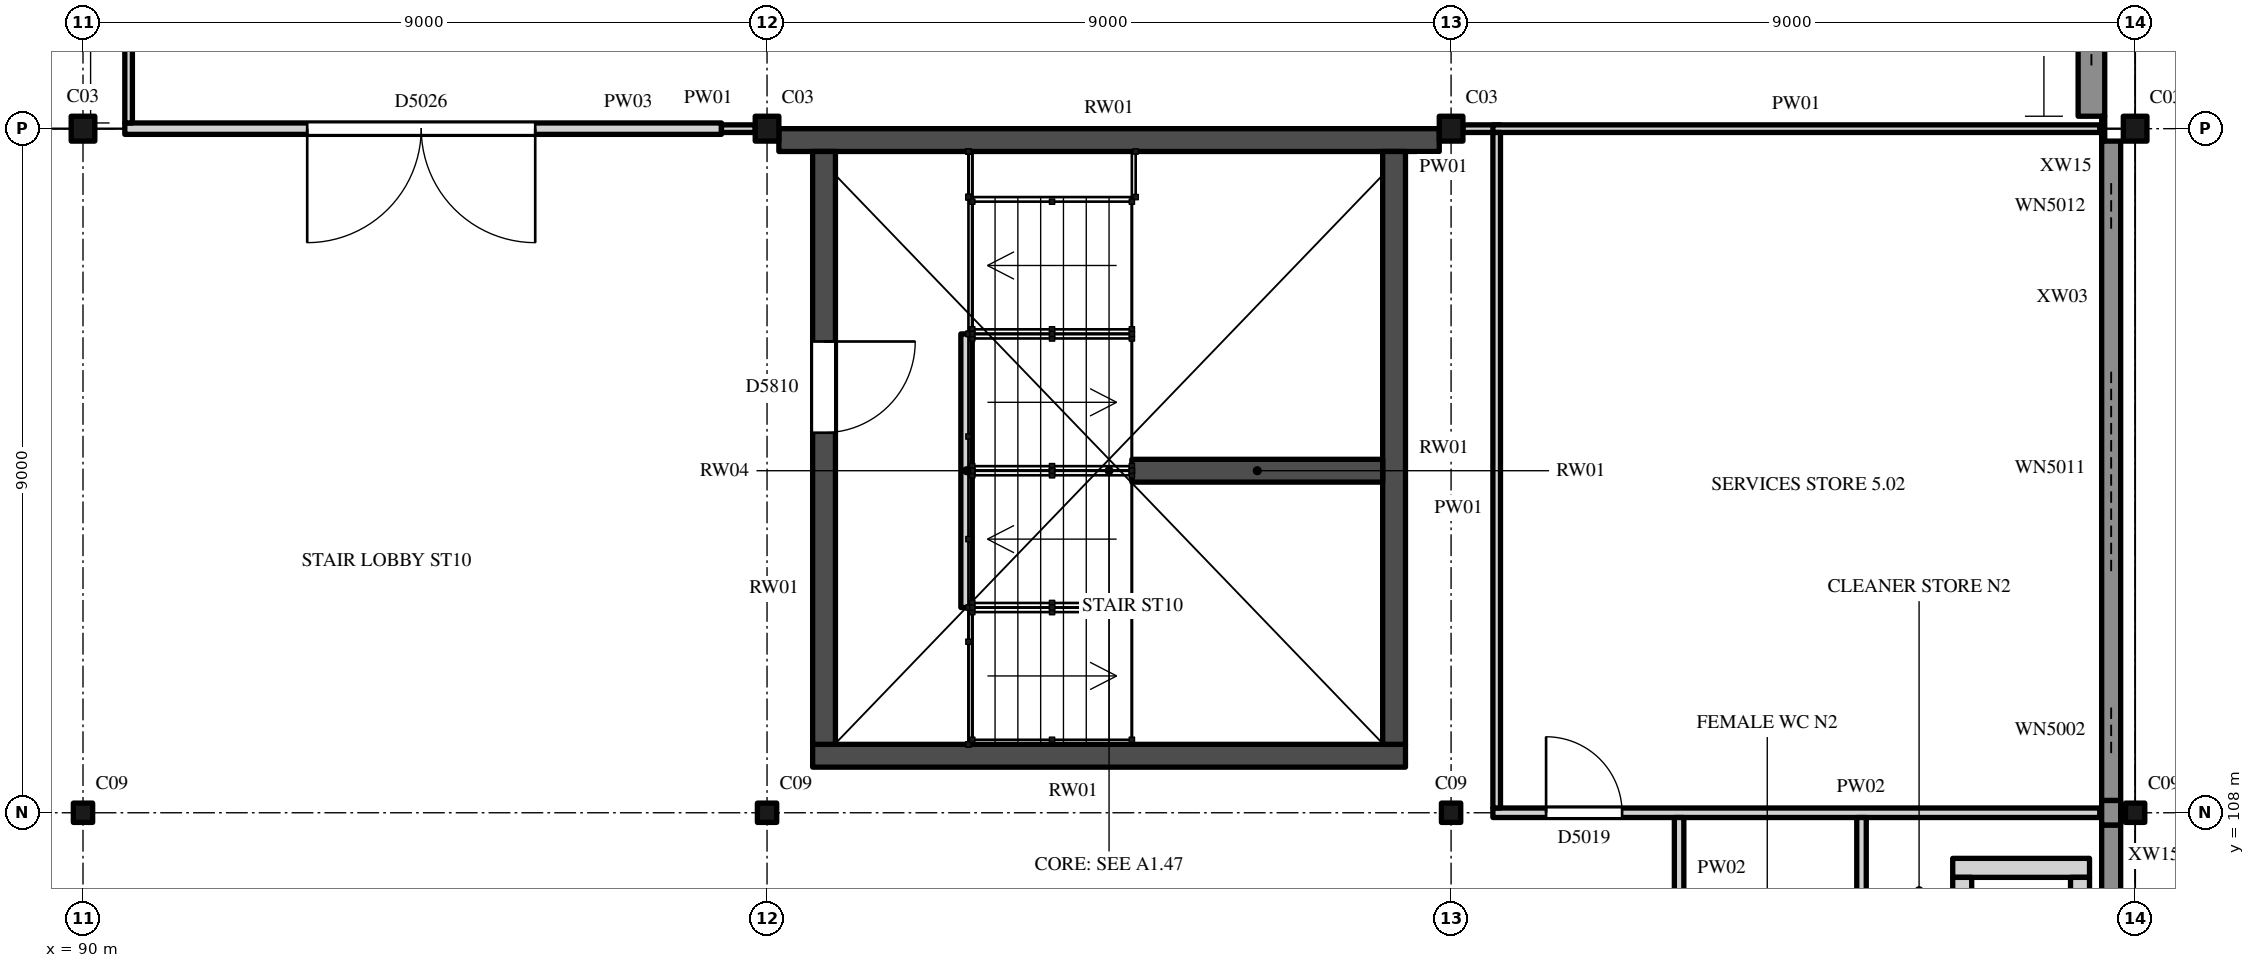
"""IFC4 building model, lengths in metres.
Left out: names, types, materials, properties, quantities, classifications, styles, units other than length and angle.
Written with IfcOpenShell. Run it as: python <this file> out.ifc"""

import sys

from ifc_helpers import new_model, si_unit, direction, frame, frame_2d, origin, origin_2d, place, context, subcontext, project, spatial, rectangle, i_section, extrude, element, fill, save


model = new_model("IFC4")
c1 = context("Model", 3, precision=1e-05, world=origin(), true_north=direction((0.0, 1.0)))
c2 = subcontext(c1, "Body", "Model", "MODEL_VIEW")
j1 = project(units=[si_unit("LENGTHUNIT", "METRE"), si_unit("PLANEANGLEUNIT", "RADIAN")], contexts=[c1])
p1 = place(None, origin())
s1 = spatial("IfcSite", under=j1, at=p1, CompositionType="ELEMENT")
p2 = place(p1, origin())
s2 = spatial("IfcBuilding", under=s1, at=p2, CompositionType="ELEMENT")
p3 = place(p2, frame((0.0, 0.0, 31.0)))
s3 = spatial("IfcBuildingStorey", under=s2, at=p3, CompositionType="ELEMENT", Elevation=31.0)
for number, where, z_axis, x_axis in (
    (1, (90.0, 108.0, 0.0), (0.0, 0.0, 1.0), (1.0, 0.0, 0.0)),
    (2, (99.0, 108.0, 0.0), (0.0, 0.0, 1.0), (1.0, 0.0, 0.0)),
    (3, (108.0, 108.0, 0.0), (0.0, 0.0, 1.0), (1.0, 0.0, 0.0)),
    (4, (117.0, 108.0, 0.0), (0.0, 0.0, 1.0), (1.0, 0.0, 0.0)),
):
    element("IfcColumn", number, at=place(p3, frame(where, z_axis=z_axis, x_axis=x_axis)), inside=s3, PredefinedType="COLUMN", context=c2, shape_type="SweptSolid", body=[
        extrude(i_section(OverallWidth=0.254, OverallDepth=0.254, WebThickness=0.009, FlangeThickness=0.014, FilletRadius=0.014, at=origin_2d()), origin(), (0.0, 0.0, 1.0), 5.0),
    ])
for number, where, z_axis, x_axis in (
    (5, (90.0, 117.0, 0.0), (0.0, 0.0, 1.0), (1.0, 0.0, 0.0)),
    (6, (99.0, 117.0, 0.0), (0.0, 0.0, 1.0), (1.0, 0.0, 0.0)),
    (7, (108.0, 117.0, 0.0), (0.0, 0.0, 1.0), (1.0, 0.0, 0.0)),
    (8, (117.0, 117.0, 0.0), (0.0, 0.0, 1.0), (1.0, 0.0, 0.0)),
):
    element("IfcColumn", number, at=place(p3, frame(where, z_axis=z_axis, x_axis=x_axis)), inside=s3, PredefinedType="COLUMN", context=c2, shape_type="SweptSolid", body=[
        extrude(i_section(OverallWidth=0.311, OverallDepth=0.327, WebThickness=0.016, FlangeThickness=0.025, FilletRadius=0.017, at=origin_2d()), origin(), (0.0, 0.0, 1.0), 5.0),
    ])
p4 = place(p3, frame((99.6, 108.75, 0.0), z_axis=(0.0, 0.0, 1.0), x_axis=(1.0, 0.0, 0.0)))
e9 = element("IfcWall", 9, at=p4, inside=s3, PredefinedType="SHEAR", context=c2, shape_type="SweptSolid", body=[
    extrude(rectangle(XDim=7.8, YDim=0.3, at=frame_2d((3.9, 0.0))), origin(), (0.0, 0.0, 1.0), 5.0),
])
p5 = place(p3, frame((99.156, 116.85, 0.0), z_axis=(0.0, 0.0, 1.0), x_axis=(1.0, 0.0, 0.0)))
e10 = element("IfcWall", 10, at=p5, inside=s3, PredefinedType="SHEAR", context=c2, shape_type="SweptSolid", body=[
    extrude(rectangle(XDim=8.689, YDim=0.3, at=frame_2d((4.344, 0.0))), origin(), (0.0, 0.0, 1.0), 5.0),
])
p6 = place(p3, frame((99.75, 108.9, 0.0), z_axis=(0.0, 0.0, 1.0), x_axis=(0.0, 1.0, 0.0)))
e11 = element("IfcWall", 11, at=p6, inside=s3, PredefinedType="SHEAR", context=c2, shape_type="SweptSolid", body=[
    extrude(rectangle(XDim=7.8, YDim=0.3, at=frame_2d((3.9, 0.0))), origin(), (0.0, 0.0, 1.0), 5.0),
])
p7 = place(p6, frame((4.1, 0.0, 0.0)))
e12 = element("IfcOpeningElement", 12, at=p7, cuts=e11, PredefinedType="OPENING", context=c2, shape_type="SweptSolid", body=[
    extrude(rectangle(XDim=1.2, YDim=2.1, at=frame_2d((0.6, 1.05))), frame((0.0, 0.16, 0.0), z_axis=(0.0, -1.0, 0.0), x_axis=(1.0, 0.0, 0.0)), (0.0, 0.0, 1.0), 0.32),
])
p8 = place(p3, frame((107.25, 108.9, 0.0), z_axis=(0.0, 0.0, 1.0), x_axis=(0.0, 1.0, 0.0)))
e13 = element("IfcWall", 13, at=p8, inside=s3, PredefinedType="SHEAR", context=c2, shape_type="SweptSolid", body=[
    extrude(rectangle(XDim=7.8, YDim=0.3, at=frame_2d((3.9, 0.0))), origin(), (0.0, 0.0, 1.0), 5.0),
])
p9 = place(p3, frame((103.8, 112.5, 0.0), z_axis=(0.0, 0.0, 1.0), x_axis=(1.0, 0.0, 0.0)))
e14 = element("IfcWall", 14, at=p9, inside=s3, PredefinedType="SHEAR", context=c2, shape_type="SweptSolid", body=[
    extrude(rectangle(XDim=3.3, YDim=0.3, at=frame_2d((1.65, 0.0))), origin(), (0.0, 0.0, 1.0), 5.0),
])
p10 = place(p3, frame((101.625, 110.7, 0.0), z_axis=(0.0, 0.0, 1.0), x_axis=(0.0, 1.0, 0.0)))
e15 = element("IfcWall", 15, at=p10, inside=s3, PredefinedType="STANDARD", context=c2, shape_type="SweptSolid", body=[
    extrude(rectangle(XDim=3.6, YDim=0.15, at=frame_2d((1.8, 0.0))), origin(), (0.0, 0.0, 1.0), 2.3),
])
p11 = place(p3, frame((114.6, 107.275, 0.0), z_axis=(0.0, 0.0, 1.0), x_axis=(1.0, 0.0, 0.0)))
e16 = element("IfcWall", 16, at=p11, inside=s3, PredefinedType="STANDARD", context=c2, shape_type="SweptSolid", body=[
    extrude(rectangle(XDim=1.8, YDim=0.25, at=frame_2d((0.9, 0.0))), origin(), (0.0, 0.0, 1.0), 5.0),
])
p12 = place(p3, frame((114.725, 104.65, 0.0), z_axis=(0.0, 0.0, 1.0), x_axis=(0.0, 1.0, 0.0)))
e17 = element("IfcWall", 17, at=p12, inside=s3, PredefinedType="STANDARD", context=c2, shape_type="SweptSolid", body=[
    extrude(rectangle(XDim=2.5, YDim=0.25, at=frame_2d((1.25, 0.0))), origin(), (0.0, 0.0, 1.0), 5.0),
])
p13 = place(p3, frame((116.275, 104.65, 0.0), z_axis=(0.0, 0.0, 1.0), x_axis=(0.0, 1.0, 0.0)))
e18 = element("IfcWall", 18, at=p13, inside=s3, PredefinedType="STANDARD", context=c2, shape_type="SweptSolid", body=[
    extrude(rectangle(XDim=2.5, YDim=0.25, at=frame_2d((1.25, 0.0))), origin(), (0.0, 0.0, 1.0), 5.0),
])
p14 = place(p13, frame((0.8, 0.0, 0.0)))
e19 = element("IfcOpeningElement", 19, at=p14, cuts=e18, PredefinedType="OPENING", context=c2, shape_type="SweptSolid", body=[
    extrude(rectangle(XDim=0.9, YDim=2.1, at=frame_2d((0.45, 1.05))), frame((0.0, 0.135, 0.0), z_axis=(0.0, -1.0, 0.0), x_axis=(1.0, 0.0, 0.0)), (0.0, 0.0, 1.0), 0.27),
])
p15 = place(p3, frame((116.685, 99.161, 0.0), z_axis=(0.0, 0.0, 1.0), x_axis=(0.0, 1.0, 0.0)))
e20 = element("IfcWall", 20, at=p15, inside=s3, PredefinedType="SOLIDWALL", context=c2, shape_type="SweptSolid", body=[
    extrude(rectangle(XDim=8.678, YDim=0.25, at=frame_2d((4.339, 0.0))), origin(), (0.0, 0.0, 1.0), 4.504),
])
p16 = place(p3, frame((116.685, 108.161, 0.0), z_axis=(0.0, 0.0, 1.0), x_axis=(0.0, 1.0, 0.0)))
e21 = element("IfcWall", 21, at=p16, inside=s3, PredefinedType="SOLIDWALL", context=c2, shape_type="SweptSolid", body=[
    extrude(rectangle(XDim=8.676, YDim=0.25, at=frame_2d((4.338, 0.0))), origin(), (0.0, 0.0, 1.0), 4.504),
])
p17 = place(p16, frame((0.623, 0.0, 1.6)))
e22 = element("IfcOpeningElement", 22, at=p17, cuts=e21, PredefinedType="OPENING", context=c2, shape_type="SweptSolid", body=[
    extrude(rectangle(XDim=0.6, YDim=1.2, at=frame_2d((0.3, 0.6))), frame((0.0, 0.135, 0.0), z_axis=(0.0, -1.0, 0.0), x_axis=(1.0, 0.0, 0.0)), (0.0, 0.0, 1.0), 0.27),
])
p18 = place(p16, frame((3.017, 0.0, 1.6)))
e23 = element("IfcOpeningElement", 23, at=p18, cuts=e21, PredefinedType="OPENING", context=c2, shape_type="SweptSolid", body=[
    extrude(rectangle(XDim=2.7, YDim=1.2, at=frame_2d((1.35, 0.6))), frame((0.0, 0.135, 0.0), z_axis=(0.0, -1.0, 0.0), x_axis=(1.0, 0.0, 0.0)), (0.0, 0.0, 1.0), 0.27),
])
p19 = place(p16, frame((7.523, 0.0, 1.6)))
e24 = element("IfcOpeningElement", 24, at=p19, cuts=e21, PredefinedType="OPENING", context=c2, shape_type="SweptSolid", body=[
    extrude(rectangle(XDim=0.6, YDim=1.2, at=frame_2d((0.3, 0.6))), frame((0.0, 0.135, 0.0), z_axis=(0.0, -1.0, 0.0), x_axis=(1.0, 0.0, 0.0)), (0.0, 0.0, 1.0), 0.27),
])
p20 = place(p3, frame((116.425, 117.164, 0.0), z_axis=(0.0, 0.0, 1.0), x_axis=(0.0, 1.0, 0.0)))
e25 = element("IfcWall", 25, at=p20, inside=s3, PredefinedType="SOLIDWALL", context=c2, shape_type="SweptSolid", body=[
    extrude(rectangle(XDim=8.836, YDim=0.35, at=frame_2d((4.418, 0.0))), origin(), (0.0, 0.0, 1.0), 4.825),
])
p21 = place(p20, frame((0.668, 0.0, 1.6)))
e26 = element("IfcOpeningElement", 26, at=p21, cuts=e25, PredefinedType="OPENING", context=c2, shape_type="SweptSolid", body=[
    extrude(rectangle(XDim=0.6, YDim=1.2, at=frame_2d((0.3, 0.6))), frame((0.0, 0.185, 0.0), z_axis=(0.0, -1.0, 0.0), x_axis=(1.0, 0.0, 0.0)), (0.0, 0.0, 1.0), 0.37),
])
p22 = place(p20, frame((3.042, 0.0, 1.6)))
e27 = element("IfcOpeningElement", 27, at=p22, cuts=e25, PredefinedType="OPENING", context=c2, shape_type="SweptSolid", body=[
    extrude(rectangle(XDim=2.7, YDim=1.2, at=frame_2d((1.35, 0.6))), frame((0.0, 0.185, 0.0), z_axis=(0.0, -1.0, 0.0), x_axis=(1.0, 0.0, 0.0)), (0.0, 0.0, 1.0), 0.37),
])
p23 = place(p20, frame((7.568, 0.0, 1.6)))
e28 = element("IfcOpeningElement", 28, at=p23, cuts=e25, PredefinedType="OPENING", context=c2, shape_type="SweptSolid", body=[
    extrude(rectangle(XDim=0.6, YDim=1.2, at=frame_2d((0.3, 0.6))), frame((0.0, 0.185, 0.0), z_axis=(0.0, -1.0, 0.0), x_axis=(1.0, 0.0, 0.0)), (0.0, 0.0, 1.0), 0.37),
])
p24 = place(p3, frame((116.685, 107.839, 0.0), z_axis=(0.0, 0.0, 1.0), x_axis=(0.0, 1.0, 0.0)))
e29 = element("IfcWall", 29, at=p24, inside=s3, PredefinedType="SOLIDWALL", context=c2, shape_type="SweptSolid", body=[
    extrude(rectangle(XDim=0.322, YDim=0.25, at=frame_2d((0.161, 0.0))), origin(), (0.0, 0.0, 1.0), 4.504),
])
p25 = place(p3, frame((116.58, 116.836, 0.0), z_axis=(0.0, 0.0, 1.0), x_axis=(0.0, 1.0, 0.0)))
e30 = element("IfcWall", 30, at=p25, inside=s3, PredefinedType="SOLIDWALL", context=c2, shape_type="SweptSolid", body=[
    extrude(rectangle(XDim=0.327, YDim=0.04, at=frame_2d((0.164, 0.0))), origin(), (0.0, 0.0, 1.0), 4.825),
])
p26 = place(p3, frame((108.55, 108.0, 0.0), z_axis=(0.0, 0.0, 1.0), x_axis=(1.0, 0.0, 0.0)))
e31 = element("IfcWall", 31, at=p26, inside=s3, PredefinedType="PARTITIONING", context=c2, shape_type="SweptSolid", body=[
    extrude(rectangle(XDim=7.985, YDim=0.125, at=frame_2d((3.992, 0.0))), origin(), (0.0, 0.0, 1.0), 4.518),
])
p27 = place(p26, frame((0.7, 0.0, 0.0)))
e32 = element("IfcOpeningElement", 32, at=p27, cuts=e31, PredefinedType="OPENING", context=c2, shape_type="SweptSolid", body=[
    extrude(rectangle(XDim=1.0, YDim=2.1, at=frame_2d((0.5, 1.05))), frame((0.0, 0.073, 0.0), z_axis=(0.0, -1.0, 0.0), x_axis=(1.0, 0.0, 0.0)), (0.0, 0.0, 1.0), 0.145),
])
p28 = place(p3, frame((90.55, 117.0, 0.0), z_axis=(0.0, 0.0, 1.0), x_axis=(1.0, 0.0, 0.0)))
e33 = element("IfcWall", 33, at=p28, inside=s3, PredefinedType="PARTITIONING", context=c2, shape_type="SweptSolid", body=[
    extrude(rectangle(XDim=7.85, YDim=0.15, at=frame_2d((3.925, 0.0))), origin(), (0.0, 0.0, 1.0), 4.518),
])
p29 = place(p28, frame((2.4, 0.0, 0.0)))
e34 = element("IfcOpeningElement", 34, at=p29, cuts=e33, PredefinedType="OPENING", context=c2, shape_type="SweptSolid", body=[
    extrude(rectangle(XDim=3.0, YDim=3.0, at=frame_2d((1.5, 1.5))), frame((0.0, 0.085, 0.0), z_axis=(0.0, -1.0, 0.0), x_axis=(1.0, 0.0, 0.0)), (0.0, 0.0, 1.0), 0.17),
])
p30 = place(p3, frame((98.4, 117.0, 0.0), z_axis=(0.0, 0.0, 1.0), x_axis=(1.0, 0.0, 0.0)))
e35 = element("IfcWall", 35, at=p30, inside=s3, PredefinedType="PARTITIONING", context=c2, shape_type="SweptSolid", body=[
    extrude(rectangle(XDim=0.444, YDim=0.1, at=frame_2d((0.222, 0.0))), origin(), (0.0, 0.0, 1.0), 4.825),
])
p31 = place(p3, frame((108.156, 117.0, 0.0), z_axis=(0.0, 0.0, 1.0), x_axis=(1.0, 0.0, 0.0)))
e36 = element("IfcWall", 36, at=p31, inside=s3, PredefinedType="PARTITIONING", context=c2, shape_type="SweptSolid", body=[
    extrude(rectangle(XDim=0.494, YDim=0.1, at=frame_2d((0.247, 0.0))), origin(), (0.0, 0.0, 1.0), 4.825),
])
p32 = place(p3, frame((108.55, 117.0, 0.0), z_axis=(0.0, 0.0, 1.0), x_axis=(1.0, 0.0, 0.0)))
e37 = element("IfcWall", 37, at=p32, inside=s3, PredefinedType="PARTITIONING", context=c2, shape_type="SweptSolid", body=[
    extrude(rectangle(XDim=7.985, YDim=0.1, at=frame_2d((3.992, 0.0))), origin(), (0.0, 0.0, 1.0), 4.518),
])
p33 = place(p3, frame((90.6, 117.075, 0.0), z_axis=(0.0, 0.0, 1.0), x_axis=(0.0, 1.0, 0.0)))
e38 = element("IfcWall", 38, at=p33, inside=s3, PredefinedType="PARTITIONING", context=c2, shape_type="SweptSolid", body=[
    extrude(rectangle(XDim=17.625, YDim=0.1, at=frame_2d((8.812, 0.0))), origin(), (0.0, 0.0, 1.0), 4.825),
])
p34 = place(p3, frame((108.6, 108.062, 0.0), z_axis=(0.0, 0.0, 1.0), x_axis=(0.0, 1.0, 0.0)))
e39 = element("IfcWall", 39, at=p34, inside=s3, PredefinedType="PARTITIONING", context=c2, shape_type="SweptSolid", body=[
    extrude(rectangle(XDim=8.887, YDim=0.1, at=frame_2d((4.444, 0.0))), origin(), (0.0, 0.0, 1.0), 4.825),
])
p35 = place(p3, frame((111.0, 104.462, 0.0), z_axis=(0.0, 0.0, 1.0), x_axis=(0.0, 1.0, 0.0)))
e40 = element("IfcWall", 40, at=p35, inside=s3, PredefinedType="PARTITIONING", context=c2, shape_type="SweptSolid", body=[
    extrude(rectangle(XDim=3.475, YDim=0.125, at=frame_2d((1.738, 0.0))), origin(), (0.0, 0.0, 1.0), 4.825),
])
p36 = place(p35, frame((1.25, 0.0, 0.0)))
e41 = element("IfcOpeningElement", 41, at=p36, cuts=e40, PredefinedType="OPENING", context=c2, shape_type="SweptSolid", body=[
    extrude(rectangle(XDim=0.9, YDim=2.1, at=frame_2d((0.45, 1.05))), frame((0.0, 0.073, 0.0), z_axis=(0.0, -1.0, 0.0), x_axis=(1.0, 0.0, 0.0)), (0.0, 0.0, 1.0), 0.145),
])
p37 = place(p3, frame((113.4, 104.462, 0.0), z_axis=(0.0, 0.0, 1.0), x_axis=(0.0, 1.0, 0.0)))
e42 = element("IfcWall", 42, at=p37, inside=s3, PredefinedType="PARTITIONING", context=c2, shape_type="SweptSolid", body=[
    extrude(rectangle(XDim=3.475, YDim=0.125, at=frame_2d((1.738, 0.0))), origin(), (0.0, 0.0, 1.0), 4.825),
])
p38 = place(p37, frame((1.25, 0.0, 0.0)))
e43 = element("IfcOpeningElement", 43, at=p38, cuts=e42, PredefinedType="OPENING", context=c2, shape_type="SweptSolid", body=[
    extrude(rectangle(XDim=1.0, YDim=2.1, at=frame_2d((0.5, 1.05))), frame((0.0, 0.073, 0.0), z_axis=(0.0, -1.0, 0.0), x_axis=(1.0, 0.0, 0.0)), (0.0, 0.0, 1.0), 0.145),
])
p39 = place(p7, origin())
e44 = element("IfcDoor", 44, at=p39, inside=s3, OperationType="SINGLE_SWING_RIGHT", PredefinedType="DOOR", context=c2, shape_type="SweptSolid", body=[
    extrude(rectangle(XDim=1.2, YDim=2.1, at=frame_2d((0.6, 1.05))), frame((0.0, 0.025, 0.0), z_axis=(0.0, -1.0, 0.0), x_axis=(1.0, 0.0, 0.0)), (0.0, 0.0, 1.0), 0.05),
])
fill(e12, e44)
p40 = place(p17, origin())
e45 = element("IfcWindow", 45, at=p40, inside=s3, PartitioningType="SINGLE_PANEL", PredefinedType="WINDOW", context=c2, shape_type="SweptSolid", body=[
    extrude(rectangle(XDim=0.6, YDim=1.2, at=frame_2d((0.3, 0.6))), frame((0.0, 0.03, 0.0), z_axis=(0.0, -1.0, 0.0), x_axis=(1.0, 0.0, 0.0)), (0.0, 0.0, 1.0), 0.06),
])
fill(e22, e45)
p41 = place(p18, origin())
e46 = element("IfcWindow", 46, at=p41, inside=s3, PartitioningType="SINGLE_PANEL", PredefinedType="WINDOW", context=c2, shape_type="SweptSolid", body=[
    extrude(rectangle(XDim=2.7, YDim=1.2, at=frame_2d((1.35, 0.6))), frame((0.0, 0.03, 0.0), z_axis=(0.0, -1.0, 0.0), x_axis=(1.0, 0.0, 0.0)), (0.0, 0.0, 1.0), 0.06),
])
fill(e23, e46)
p42 = place(p19, origin())
e47 = element("IfcWindow", 47, at=p42, inside=s3, PartitioningType="SINGLE_PANEL", PredefinedType="WINDOW", context=c2, shape_type="SweptSolid", body=[
    extrude(rectangle(XDim=0.6, YDim=1.2, at=frame_2d((0.3, 0.6))), frame((0.0, 0.03, 0.0), z_axis=(0.0, -1.0, 0.0), x_axis=(1.0, 0.0, 0.0)), (0.0, 0.0, 1.0), 0.06),
])
fill(e24, e47)
p43 = place(p21, origin())
e48 = element("IfcWindow", 48, at=p43, inside=s3, PartitioningType="SINGLE_PANEL", PredefinedType="WINDOW", context=c2, shape_type="SweptSolid", body=[
    extrude(rectangle(XDim=0.6, YDim=1.2, at=frame_2d((0.3, 0.6))), frame((0.0, 0.03, 0.0), z_axis=(0.0, -1.0, 0.0), x_axis=(1.0, 0.0, 0.0)), (0.0, 0.0, 1.0), 0.06),
])
fill(e26, e48)
p44 = place(p27, origin())
e49 = element("IfcDoor", 49, at=p44, inside=s3, OperationType="SINGLE_SWING_RIGHT", PredefinedType="DOOR", context=c2, shape_type="SweptSolid", body=[
    extrude(rectangle(XDim=1.0, YDim=2.1, at=frame_2d((0.5, 1.05))), frame((0.0, 0.025, 0.0), z_axis=(0.0, -1.0, 0.0), x_axis=(1.0, 0.0, 0.0)), (0.0, 0.0, 1.0), 0.05),
])
fill(e32, e49)
p45 = place(p29, origin())
e50 = element("IfcDoor", 50, at=p45, inside=s3, OperationType="DOUBLE_DOOR_SINGLE_SWING", PredefinedType="DOOR", context=c2, shape_type="SweptSolid", body=[
    extrude(rectangle(XDim=3.0, YDim=3.0, at=frame_2d((1.5, 1.5))), frame((0.0, 0.025, 0.0), z_axis=(0.0, -1.0, 0.0), x_axis=(1.0, 0.0, 0.0)), (0.0, 0.0, 1.0), 0.05),
])
fill(e34, e50)
save(model, sys.argv[1])
